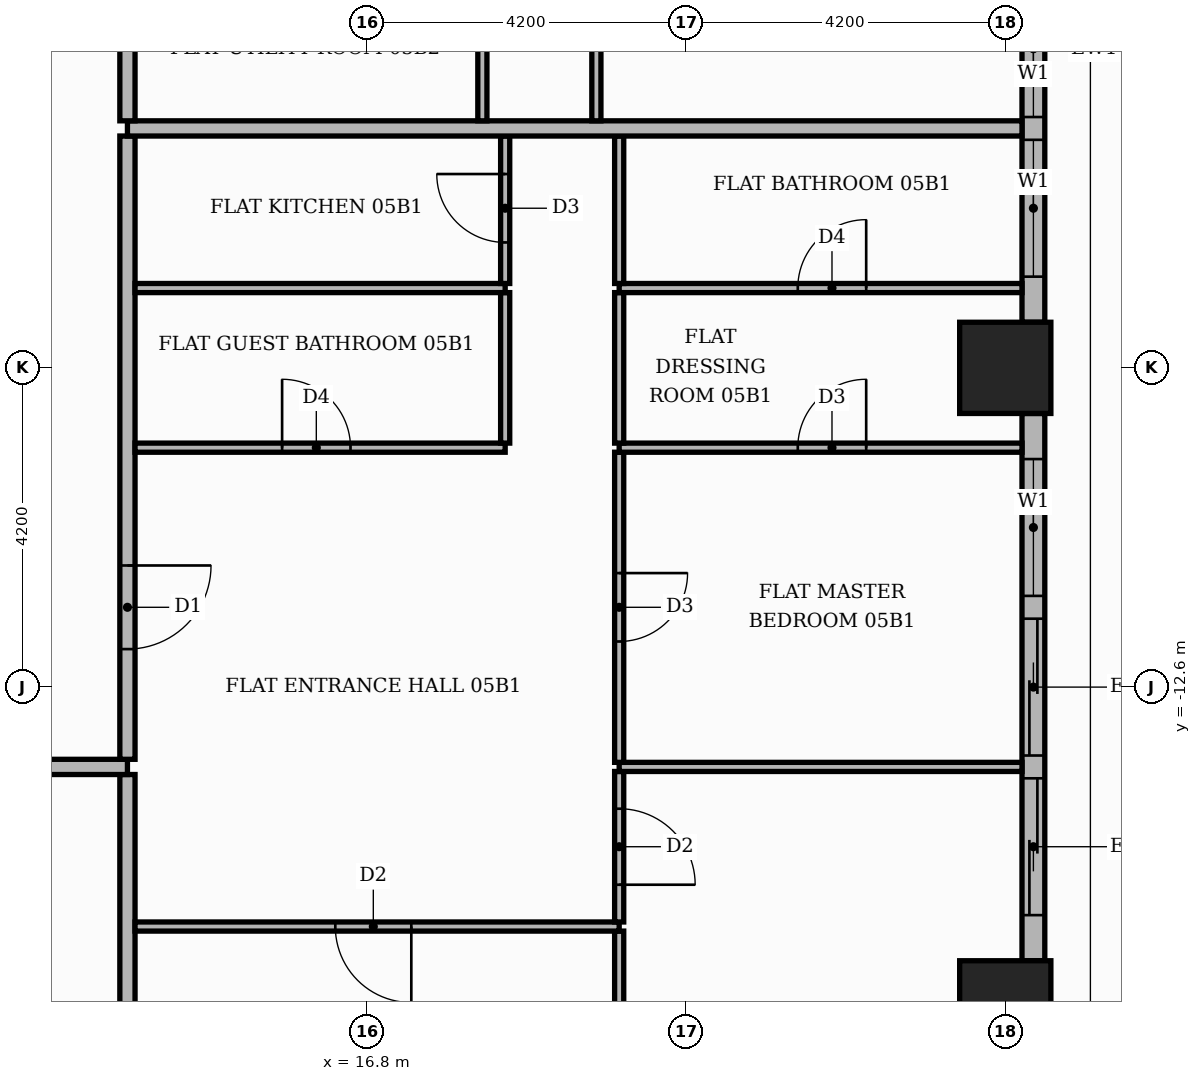
"""IFC4 building model, lengths in metres.
Left out: names, types, materials, properties, quantities, classifications, styles, units other than length and angle.
Written with IfcOpenShell. Run it as: python <this file> out.ifc"""

import sys

from ifc_helpers import new_model, si_unit, direction, frame, frame_2d, origin, origin_2d, place, context, subcontext, project, spatial, rectangle, extrude, element, fill, save


model = new_model("IFC4")
c1 = context("Model", 3, precision=1e-05, world=origin(), true_north=direction((0.0, 1.0)))
c2 = subcontext(c1, "Body", "Model", "MODEL_VIEW")
j1 = project(units=[si_unit("LENGTHUNIT", "METRE"), si_unit("PLANEANGLEUNIT", "RADIAN")], contexts=[c1])
p1 = place(None, origin())
s1 = spatial("IfcSite", under=j1, at=p1, CompositionType="ELEMENT")
p2 = place(p1, origin())
s2 = spatial("IfcBuilding", under=s1, at=p2, CompositionType="ELEMENT")
p3 = place(p2, frame((0.0, 0.0, 27.0)))
s3 = spatial("IfcBuildingStorey", under=s2, at=p3, CompositionType="ELEMENT", Elevation=27.0)
for number, where, z_axis, x_axis in (
    (1, (25.2, -8.4, 0.0), (0.0, 0.0, 1.0), (1.0, 0.0, 0.0)),
    (2, (25.2, -16.8, 0.0), (0.0, 0.0, 1.0), (1.0, 0.0, 0.0)),
):
    element("IfcColumn", number, at=place(p3, frame(where, z_axis=z_axis, x_axis=x_axis)), inside=s3, PredefinedType="COLUMN", context=c2, shape_type="SweptSolid", body=[
        extrude(rectangle(XDim=1.2, YDim=1.2, at=origin_2d()), origin(), (0.0, 0.0, 1.0), 3.9),
    ])
p4 = place(p3, frame((25.57, -16.2, 0.0), z_axis=(0.0, 0.0, 1.0), x_axis=(0.0, 1.0, 0.0)))
e3 = element("IfcWall", 3, at=p4, inside=s3, PredefinedType="STANDARD", context=c2, shape_type="SweptSolid", body=[
    extrude(rectangle(XDim=7.2, YDim=0.3, at=frame_2d((3.6, 0.0))), origin(), (0.0, 0.0, 1.0), 3.48),
])
p5 = place(p4, frame((0.6, 0.0, 0.0)))
e4 = element("IfcOpeningElement", 4, at=p5, cuts=e3, PredefinedType="OPENING", context=c2, shape_type="SweptSolid", body=[
    extrude(rectangle(XDim=1.8, YDim=2.4, at=frame_2d((0.9, 1.2))), frame((0.0, 0.16, 0.0), z_axis=(0.0, -1.0, 0.0), x_axis=(1.0, 0.0, 0.0)), (0.0, 0.0, 1.0), 0.32),
])
p6 = place(p4, frame((2.7, 0.0, 0.0)))
e5 = element("IfcOpeningElement", 5, at=p6, cuts=e3, PredefinedType="OPENING", context=c2, shape_type="SweptSolid", body=[
    extrude(rectangle(XDim=1.8, YDim=2.4, at=frame_2d((0.9, 1.2))), frame((0.0, 0.16, 0.0), z_axis=(0.0, -1.0, 0.0), x_axis=(1.0, 0.0, 0.0)), (0.0, 0.0, 1.0), 0.32),
])
p7 = place(p4, frame((4.8, 0.0, 0.9)))
e6 = element("IfcOpeningElement", 6, at=p7, cuts=e3, PredefinedType="OPENING", context=c2, shape_type="SweptSolid", body=[
    extrude(rectangle(XDim=1.8, YDim=2.1, at=frame_2d((0.9, 1.05))), frame((0.0, 0.16, 0.0), z_axis=(0.0, -1.0, 0.0), x_axis=(1.0, 0.0, 0.0)), (0.0, 0.0, 1.0), 0.32),
])
p8 = place(p3, frame((25.57, -7.8, 0.0), z_axis=(0.0, 0.0, 1.0), x_axis=(0.0, 1.0, 0.0)))
e7 = element("IfcWall", 7, at=p8, inside=s3, PredefinedType="STANDARD", context=c2, shape_type="SweptSolid", body=[
    extrude(rectangle(XDim=7.2, YDim=0.3, at=frame_2d((3.6, 0.0))), origin(), (0.0, 0.0, 1.0), 3.48),
])
p9 = place(p8, frame((0.6, 0.0, 0.9)))
e8 = element("IfcOpeningElement", 8, at=p9, cuts=e7, PredefinedType="OPENING", context=c2, shape_type="SweptSolid", body=[
    extrude(rectangle(XDim=1.8, YDim=2.1, at=frame_2d((0.9, 1.05))), frame((0.0, 0.16, 0.0), z_axis=(0.0, -1.0, 0.0), x_axis=(1.0, 0.0, 0.0)), (0.0, 0.0, 1.0), 0.32),
])
p10 = place(p8, frame((2.7, 0.0, 0.9)))
e9 = element("IfcOpeningElement", 9, at=p10, cuts=e7, PredefinedType="OPENING", context=c2, shape_type="SweptSolid", body=[
    extrude(rectangle(XDim=1.8, YDim=2.1, at=frame_2d((0.9, 1.05))), frame((0.0, 0.16, 0.0), z_axis=(0.0, -1.0, 0.0), x_axis=(1.0, 0.0, 0.0)), (0.0, 0.0, 1.0), 0.32),
])
p11 = place(p8, frame((4.8, 0.0, 0.0)))
e10 = element("IfcOpeningElement", 10, at=p11, cuts=e7, PredefinedType="OPENING", context=c2, shape_type="SweptSolid", body=[
    extrude(rectangle(XDim=1.8, YDim=2.4, at=frame_2d((0.9, 1.2))), frame((0.0, 0.16, 0.0), z_axis=(0.0, -1.0, 0.0), x_axis=(1.0, 0.0, 0.0)), (0.0, 0.0, 1.0), 0.32),
])
p12 = place(p3, frame((13.65, -25.42, 0.0), z_axis=(0.0, 0.0, 1.0), x_axis=(0.0, 1.0, 0.0)))
e11 = element("IfcWall", 11, at=p12, inside=s3, PredefinedType="PARTITIONING", context=c2, shape_type="SweptSolid", body=[
    extrude(rectangle(XDim=11.67, YDim=0.2, at=frame_2d((5.835, 0.0))), origin(), (0.0, 0.0, 1.0), 3.48),
])
p13 = place(p3, frame((20.12, -17.3, 0.0), z_axis=(0.0, 0.0, 1.0), x_axis=(0.0, 1.0, 0.0)))
e12 = element("IfcWall", 12, at=p13, inside=s3, PredefinedType="PARTITIONING", context=c2, shape_type="SweptSolid", body=[
    extrude(rectangle(XDim=1.49, YDim=0.12, at=frame_2d((0.745, 0.0))), origin(), (0.0, 0.0, 1.0), 3.48),
])
p14 = place(p3, frame((13.75, -15.75, 0.0), z_axis=(0.0, 0.0, 1.0), x_axis=(1.0, 0.0, 0.0)))
e13 = element("IfcWall", 13, at=p14, inside=s3, PredefinedType="PARTITIONING", context=c2, shape_type="SweptSolid", body=[
    extrude(rectangle(XDim=6.37, YDim=0.12, at=frame_2d((3.185, 0.0))), origin(), (0.0, 0.0, 1.0), 3.48),
])
p15 = place(p14, frame((2.635, 0.0, 0.0)))
e14 = element("IfcOpeningElement", 14, at=p15, cuts=e13, PredefinedType="OPENING", context=c2, shape_type="SweptSolid", body=[
    extrude(rectangle(XDim=1.0, YDim=2.1, at=frame_2d((0.5, 1.05))), frame((0.0, 0.07, 0.0), z_axis=(0.0, -1.0, 0.0), x_axis=(1.0, 0.0, 0.0)), (0.0, 0.0, 1.0), 0.14),
])
p16 = place(p3, frame((20.12, -15.69, 0.0), z_axis=(0.0, 0.0, 1.0), x_axis=(0.0, 1.0, 0.0)))
e15 = element("IfcWall", 15, at=p16, inside=s3, PredefinedType="PARTITIONING", context=c2, shape_type="SweptSolid", body=[
    extrude(rectangle(XDim=1.98, YDim=0.12, at=frame_2d((0.99, 0.0))), origin(), (0.0, 0.0, 1.0), 3.48),
])
p17 = place(p16, frame((0.49, 0.0, 0.0)))
e16 = element("IfcOpeningElement", 16, at=p17, cuts=e15, PredefinedType="OPENING", context=c2, shape_type="SweptSolid", body=[
    extrude(rectangle(XDim=1.0, YDim=2.1, at=frame_2d((0.5, 1.05))), frame((0.0, 0.07, 0.0), z_axis=(0.0, -1.0, 0.0), x_axis=(1.0, 0.0, 0.0)), (0.0, 0.0, 1.0), 0.14),
])
p18 = place(p3, frame((-25.42, -13.65, 0.0), z_axis=(0.0, 0.0, 1.0), x_axis=(1.0, 0.0, 0.0)))
e17 = element("IfcWall", 17, at=p18, inside=s3, PredefinedType="PARTITIONING", context=c2, shape_type="SweptSolid", body=[
    extrude(rectangle(XDim=39.07, YDim=0.2, at=frame_2d((19.535, 0.0))), origin(), (0.0, 0.0, 1.0), 3.48),
])
p19 = place(p18, frame((14.37, 0.0, 0.0)))
e18 = element("IfcOpeningElement", 18, at=p19, cuts=e17, PredefinedType="OPENING", context=c2, shape_type="SweptSolid", body=[
    extrude(rectangle(XDim=1.1, YDim=2.4, at=frame_2d((0.55, 1.2))), frame((0.0, 0.11, 0.0), z_axis=(0.0, -1.0, 0.0), x_axis=(1.0, 0.0, 0.0)), (0.0, 0.0, 1.0), 0.22),
])
p20 = place(p3, frame((20.12, -13.65, 0.0), z_axis=(0.0, 0.0, 1.0), x_axis=(1.0, 0.0, 0.0)))
e19 = element("IfcWall", 19, at=p20, inside=s3, PredefinedType="PARTITIONING", context=c2, shape_type="SweptSolid", body=[
    extrude(rectangle(XDim=5.3, YDim=0.12, at=frame_2d((2.65, 0.0))), origin(), (0.0, 0.0, 1.0), 3.48),
])
p21 = place(p3, frame((20.12, -13.59, 0.0), z_axis=(0.0, 0.0, 1.0), x_axis=(0.0, 1.0, 0.0)))
e20 = element("IfcWall", 20, at=p21, inside=s3, PredefinedType="PARTITIONING", context=c2, shape_type="SweptSolid", body=[
    extrude(rectangle(XDim=4.08, YDim=0.12, at=frame_2d((2.04, 0.0))), origin(), (0.0, 0.0, 1.0), 3.48),
])
p22 = place(p21, frame((1.59, 0.0, 0.0)))
e21 = element("IfcOpeningElement", 21, at=p22, cuts=e20, PredefinedType="OPENING", context=c2, shape_type="SweptSolid", body=[
    extrude(rectangle(XDim=0.9, YDim=2.1, at=frame_2d((0.45, 1.05))), frame((0.0, 0.07, 0.0), z_axis=(0.0, -1.0, 0.0), x_axis=(1.0, 0.0, 0.0)), (0.0, 0.0, 1.0), 0.14),
])
p23 = place(p3, frame((13.65, -13.55, 0.0), z_axis=(0.0, 0.0, 1.0), x_axis=(0.0, 1.0, 0.0)))
e22 = element("IfcWall", 22, at=p23, inside=s3, PredefinedType="PARTITIONING", context=c2, shape_type="SweptSolid", body=[
    extrude(rectangle(XDim=8.2, YDim=0.2, at=frame_2d((4.1, 0.0))), origin(), (0.0, 0.0, 1.0), 3.48),
])
p24 = place(p23, frame((1.45, 0.0, 0.0)))
e23 = element("IfcOpeningElement", 23, at=p24, cuts=e22, PredefinedType="OPENING", context=c2, shape_type="SweptSolid", body=[
    extrude(rectangle(XDim=1.1, YDim=2.4, at=frame_2d((0.55, 1.2))), frame((0.0, 0.11, 0.0), z_axis=(0.0, -1.0, 0.0), x_axis=(1.0, 0.0, 0.0)), (0.0, 0.0, 1.0), 0.22),
])
p25 = place(p3, frame((13.75, -9.45, 0.0), z_axis=(0.0, 0.0, 1.0), x_axis=(1.0, 0.0, 0.0)))
e24 = element("IfcWall", 24, at=p25, inside=s3, PredefinedType="PARTITIONING", context=c2, shape_type="SweptSolid", body=[
    extrude(rectangle(XDim=4.87, YDim=0.12, at=frame_2d((2.435, 0.0))), origin(), (0.0, 0.0, 1.0), 3.48),
])
p26 = place(p25, frame((1.935, 0.0, 0.0)))
e25 = element("IfcOpeningElement", 25, at=p26, cuts=e24, PredefinedType="OPENING", context=c2, shape_type="SweptSolid", body=[
    extrude(rectangle(XDim=0.9, YDim=2.1, at=frame_2d((0.45, 1.05))), frame((0.0, 0.07, 0.0), z_axis=(0.0, -1.0, 0.0), x_axis=(1.0, 0.0, 0.0)), (0.0, 0.0, 1.0), 0.14),
])
p27 = place(p3, frame((20.12, -9.45, 0.0), z_axis=(0.0, 0.0, 1.0), x_axis=(1.0, 0.0, 0.0)))
e26 = element("IfcWall", 26, at=p27, inside=s3, PredefinedType="PARTITIONING", context=c2, shape_type="SweptSolid", body=[
    extrude(rectangle(XDim=5.3, YDim=0.12, at=frame_2d((2.65, 0.0))), origin(), (0.0, 0.0, 1.0), 3.48),
])
p28 = place(p27, frame((2.35, 0.0, 0.0)))
e27 = element("IfcOpeningElement", 27, at=p28, cuts=e26, PredefinedType="OPENING", context=c2, shape_type="SweptSolid", body=[
    extrude(rectangle(XDim=0.9, YDim=2.1, at=frame_2d((0.45, 1.05))), frame((0.0, 0.07, 0.0), z_axis=(0.0, -1.0, 0.0), x_axis=(1.0, 0.0, 0.0)), (0.0, 0.0, 1.0), 0.14),
])
for number, where, z_axis, x_axis in (
    (28, (18.62, -9.39, 0.0), (0.0, 0.0, 1.0), (0.0, 1.0, 0.0)),
    (29, (20.12, -9.39, 0.0), (0.0, 0.0, 1.0), (0.0, 1.0, 0.0)),
):
    element("IfcWall", number, at=place(p3, frame(where, z_axis=z_axis, x_axis=x_axis)), inside=s3, PredefinedType="PARTITIONING", context=c2, shape_type="SweptSolid", body=[
        extrude(rectangle(XDim=1.98, YDim=0.12, at=frame_2d((0.99, 0.0))), origin(), (0.0, 0.0, 1.0), 3.48),
    ])
p29 = place(p3, frame((13.75, -7.35, 0.0), z_axis=(0.0, 0.0, 1.0), x_axis=(1.0, 0.0, 0.0)))
e30 = element("IfcWall", 30, at=p29, inside=s3, PredefinedType="PARTITIONING", context=c2, shape_type="SweptSolid", body=[
    extrude(rectangle(XDim=4.87, YDim=0.12, at=frame_2d((2.435, 0.0))), origin(), (0.0, 0.0, 1.0), 3.48),
])
p30 = place(p3, frame((20.12, -7.35, 0.0), z_axis=(0.0, 0.0, 1.0), x_axis=(1.0, 0.0, 0.0)))
e31 = element("IfcWall", 31, at=p30, inside=s3, PredefinedType="PARTITIONING", context=c2, shape_type="SweptSolid", body=[
    extrude(rectangle(XDim=5.3, YDim=0.12, at=frame_2d((2.65, 0.0))), origin(), (0.0, 0.0, 1.0), 3.48),
])
p31 = place(p30, frame((2.35, 0.0, 0.0)))
e32 = element("IfcOpeningElement", 32, at=p31, cuts=e31, PredefinedType="OPENING", context=c2, shape_type="SweptSolid", body=[
    extrude(rectangle(XDim=0.9, YDim=2.1, at=frame_2d((0.45, 1.05))), frame((0.0, 0.07, 0.0), z_axis=(0.0, -1.0, 0.0), x_axis=(1.0, 0.0, 0.0)), (0.0, 0.0, 1.0), 0.14),
])
p32 = place(p3, frame((18.62, -7.29, 0.0), z_axis=(0.0, 0.0, 1.0), x_axis=(0.0, 1.0, 0.0)))
e33 = element("IfcWall", 33, at=p32, inside=s3, PredefinedType="PARTITIONING", context=c2, shape_type="SweptSolid", body=[
    extrude(rectangle(XDim=1.94, YDim=0.12, at=frame_2d((0.97, 0.0))), origin(), (0.0, 0.0, 1.0), 3.48),
])
p33 = place(p32, frame((0.54, 0.0, 0.0)))
e34 = element("IfcOpeningElement", 34, at=p33, cuts=e33, PredefinedType="OPENING", context=c2, shape_type="SweptSolid", body=[
    extrude(rectangle(XDim=0.9, YDim=2.1, at=frame_2d((0.45, 1.05))), frame((0.0, 0.07, 0.0), z_axis=(0.0, -1.0, 0.0), x_axis=(1.0, 0.0, 0.0)), (0.0, 0.0, 1.0), 0.14),
])
p34 = place(p3, frame((20.12, -7.29, 0.0), z_axis=(0.0, 0.0, 1.0), x_axis=(0.0, 1.0, 0.0)))
e35 = element("IfcWall", 35, at=p34, inside=s3, PredefinedType="PARTITIONING", context=c2, shape_type="SweptSolid", body=[
    extrude(rectangle(XDim=1.94, YDim=0.12, at=frame_2d((0.97, 0.0))), origin(), (0.0, 0.0, 1.0), 3.48),
])
p35 = place(p3, frame((13.65, -5.25, 0.0), z_axis=(0.0, 0.0, 1.0), x_axis=(1.0, 0.0, 0.0)))
e36 = element("IfcWall", 36, at=p35, inside=s3, PredefinedType="PARTITIONING", context=c2, shape_type="SweptSolid", body=[
    extrude(rectangle(XDim=11.77, YDim=0.2, at=frame_2d((5.885, 0.0))), origin(), (0.0, 0.0, 1.0), 3.48),
])
p36 = place(p3, frame((13.65, -5.15, 0.0), z_axis=(0.0, 0.0, 1.0), x_axis=(0.0, 1.0, 0.0)))
e37 = element("IfcWall", 37, at=p36, inside=s3, PredefinedType="PARTITIONING", context=c2, shape_type="SweptSolid", body=[
    extrude(rectangle(XDim=18.7, YDim=0.2, at=frame_2d((9.35, 0.0))), origin(), (0.0, 0.0, 1.0), 3.48),
])
p37 = place(p36, frame((3.55, 0.0, 0.0)))
e38 = element("IfcOpeningElement", 38, at=p37, cuts=e37, PredefinedType="OPENING", context=c2, shape_type="SweptSolid", body=[
    extrude(rectangle(XDim=1.1, YDim=2.4, at=frame_2d((0.55, 1.2))), frame((0.0, 0.11, 0.0), z_axis=(0.0, -1.0, 0.0), x_axis=(1.0, 0.0, 0.0)), (0.0, 0.0, 1.0), 0.22),
])
p38 = place(p3, frame((18.32, -5.15, 0.0), z_axis=(0.0, 0.0, 1.0), x_axis=(0.0, 1.0, 0.0)))
e39 = element("IfcWall", 39, at=p38, inside=s3, PredefinedType="PARTITIONING", context=c2, shape_type="SweptSolid", body=[
    extrude(rectangle(XDim=1.94, YDim=0.12, at=frame_2d((0.97, 0.0))), origin(), (0.0, 0.0, 1.0), 3.48),
])
p39 = place(p3, frame((19.82, -5.15, 0.0), z_axis=(0.0, 0.0, 1.0), x_axis=(0.0, 1.0, 0.0)))
e40 = element("IfcWall", 40, at=p39, inside=s3, PredefinedType="PARTITIONING", context=c2, shape_type="SweptSolid", body=[
    extrude(rectangle(XDim=4.04, YDim=0.12, at=frame_2d((2.02, 0.0))), origin(), (0.0, 0.0, 1.0), 3.48),
])
p40 = place(p39, frame((1.5, 0.0, 0.0)))
e41 = element("IfcOpeningElement", 41, at=p40, cuts=e40, PredefinedType="OPENING", context=c2, shape_type="SweptSolid", body=[
    extrude(rectangle(XDim=1.0, YDim=2.1, at=frame_2d((0.5, 1.05))), frame((0.0, 0.07, 0.0), z_axis=(0.0, -1.0, 0.0), x_axis=(1.0, 0.0, 0.0)), (0.0, 0.0, 1.0), 0.14),
])
p41 = place(p5, origin())
e42 = element("IfcDoor", 42, at=p41, inside=s3, OperationType="SLIDING_TO_LEFT", PredefinedType="DOOR", context=c2, shape_type="SweptSolid", body=[
    extrude(rectangle(XDim=1.8, YDim=2.4, at=frame_2d((0.9, 1.2))), frame((0.0, 0.025, 0.0), z_axis=(0.0, -1.0, 0.0), x_axis=(1.0, 0.0, 0.0)), (0.0, 0.0, 1.0), 0.05),
])
fill(e4, e42)
p42 = place(p6, origin())
e43 = element("IfcDoor", 43, at=p42, inside=s3, OperationType="SLIDING_TO_RIGHT", PredefinedType="DOOR", context=c2, shape_type="SweptSolid", body=[
    extrude(rectangle(XDim=1.8, YDim=2.4, at=frame_2d((0.9, 1.2))), frame((0.0, 0.025, 0.0), z_axis=(0.0, -1.0, 0.0), x_axis=(1.0, 0.0, 0.0)), (0.0, 0.0, 1.0), 0.05),
])
fill(e5, e43)
p43 = place(p7, origin())
e44 = element("IfcWindow", 44, at=p43, inside=s3, PartitioningType="SINGLE_PANEL", PredefinedType="WINDOW", context=c2, shape_type="SweptSolid", body=[
    extrude(rectangle(XDim=1.8, YDim=2.1, at=frame_2d((0.9, 1.05))), frame((0.0, 0.03, 0.0), z_axis=(0.0, -1.0, 0.0), x_axis=(1.0, 0.0, 0.0)), (0.0, 0.0, 1.0), 0.06),
])
fill(e6, e44)
p44 = place(p9, origin())
e45 = element("IfcWindow", 45, at=p44, inside=s3, PartitioningType="SINGLE_PANEL", PredefinedType="WINDOW", context=c2, shape_type="SweptSolid", body=[
    extrude(rectangle(XDim=1.8, YDim=2.1, at=frame_2d((0.9, 1.05))), frame((0.0, 0.03, 0.0), z_axis=(0.0, -1.0, 0.0), x_axis=(1.0, 0.0, 0.0)), (0.0, 0.0, 1.0), 0.06),
])
fill(e8, e45)
p45 = place(p10, origin())
e46 = element("IfcWindow", 46, at=p45, inside=s3, PartitioningType="SINGLE_PANEL", PredefinedType="WINDOW", context=c2, shape_type="SweptSolid", body=[
    extrude(rectangle(XDim=1.8, YDim=2.1, at=frame_2d((0.9, 1.05))), frame((0.0, 0.03, 0.0), z_axis=(0.0, -1.0, 0.0), x_axis=(1.0, 0.0, 0.0)), (0.0, 0.0, 1.0), 0.06),
])
fill(e9, e46)
p46 = place(p24, frame((1.1, 0.0, 0.0), z_axis=(0.0, 0.0, 1.0), x_axis=(-1.0, 0.0, 0.0)))
e47 = element("IfcDoor", 47, at=p46, inside=s3, OperationType="SINGLE_SWING_RIGHT", PredefinedType="DOOR", context=c2, shape_type="SweptSolid", body=[
    extrude(rectangle(XDim=1.1, YDim=2.4, at=frame_2d((0.55, 1.2))), frame((0.0, 0.025, 0.0), z_axis=(0.0, -1.0, 0.0), x_axis=(1.0, 0.0, 0.0)), (0.0, 0.0, 1.0), 0.05),
])
fill(e23, e47)
p47 = place(p15, frame((1.0, 0.0, 0.0), z_axis=(0.0, 0.0, 1.0), x_axis=(-1.0, 0.0, 0.0)))
e48 = element("IfcDoor", 48, at=p47, inside=s3, OperationType="SINGLE_SWING_RIGHT", PredefinedType="DOOR", context=c2, shape_type="SweptSolid", body=[
    extrude(rectangle(XDim=1.0, YDim=2.1, at=frame_2d((0.5, 1.05))), frame((0.0, 0.025, 0.0), z_axis=(0.0, -1.0, 0.0), x_axis=(1.0, 0.0, 0.0)), (0.0, 0.0, 1.0), 0.05),
])
fill(e14, e48)
p48 = place(p26, origin())
e49 = element("IfcDoor", 49, at=p48, inside=s3, OperationType="SINGLE_SWING_LEFT", PredefinedType="DOOR", context=c2, shape_type="SweptSolid", body=[
    extrude(rectangle(XDim=0.9, YDim=2.1, at=frame_2d((0.45, 1.05))), frame((0.0, 0.025, 0.0), z_axis=(0.0, -1.0, 0.0), x_axis=(1.0, 0.0, 0.0)), (0.0, 0.0, 1.0), 0.05),
])
fill(e25, e49)
p49 = place(p33, origin())
e50 = element("IfcDoor", 50, at=p49, inside=s3, OperationType="SINGLE_SWING_RIGHT", PredefinedType="DOOR", context=c2, shape_type="SweptSolid", body=[
    extrude(rectangle(XDim=0.9, YDim=2.1, at=frame_2d((0.45, 1.05))), frame((0.0, 0.025, 0.0), z_axis=(0.0, -1.0, 0.0), x_axis=(1.0, 0.0, 0.0)), (0.0, 0.0, 1.0), 0.05),
])
fill(e34, e50)
p50 = place(p17, frame((1.0, 0.0, 0.0), z_axis=(0.0, 0.0, 1.0), x_axis=(-1.0, 0.0, 0.0)))
e51 = element("IfcDoor", 51, at=p50, inside=s3, OperationType="SINGLE_SWING_LEFT", PredefinedType="DOOR", context=c2, shape_type="SweptSolid", body=[
    extrude(rectangle(XDim=1.0, YDim=2.1, at=frame_2d((0.5, 1.05))), frame((0.0, 0.025, 0.0), z_axis=(0.0, -1.0, 0.0), x_axis=(1.0, 0.0, 0.0)), (0.0, 0.0, 1.0), 0.05),
])
fill(e16, e51)
p51 = place(p22, frame((0.9, 0.0, 0.0), z_axis=(0.0, 0.0, 1.0), x_axis=(-1.0, 0.0, 0.0)))
e52 = element("IfcDoor", 52, at=p51, inside=s3, OperationType="SINGLE_SWING_RIGHT", PredefinedType="DOOR", context=c2, shape_type="SweptSolid", body=[
    extrude(rectangle(XDim=0.9, YDim=2.1, at=frame_2d((0.45, 1.05))), frame((0.0, 0.025, 0.0), z_axis=(0.0, -1.0, 0.0), x_axis=(1.0, 0.0, 0.0)), (0.0, 0.0, 1.0), 0.05),
])
fill(e21, e52)
p52 = place(p28, origin())
e53 = element("IfcDoor", 53, at=p52, inside=s3, OperationType="SINGLE_SWING_RIGHT", PredefinedType="DOOR", context=c2, shape_type="SweptSolid", body=[
    extrude(rectangle(XDim=0.9, YDim=2.1, at=frame_2d((0.45, 1.05))), frame((0.0, 0.025, 0.0), z_axis=(0.0, -1.0, 0.0), x_axis=(1.0, 0.0, 0.0)), (0.0, 0.0, 1.0), 0.05),
])
fill(e27, e53)
p53 = place(p31, origin())
e54 = element("IfcDoor", 54, at=p53, inside=s3, OperationType="SINGLE_SWING_RIGHT", PredefinedType="DOOR", context=c2, shape_type="SweptSolid", body=[
    extrude(rectangle(XDim=0.9, YDim=2.1, at=frame_2d((0.45, 1.05))), frame((0.0, 0.025, 0.0), z_axis=(0.0, -1.0, 0.0), x_axis=(1.0, 0.0, 0.0)), (0.0, 0.0, 1.0), 0.05),
])
fill(e32, e54)
save(model, sys.argv[1])
